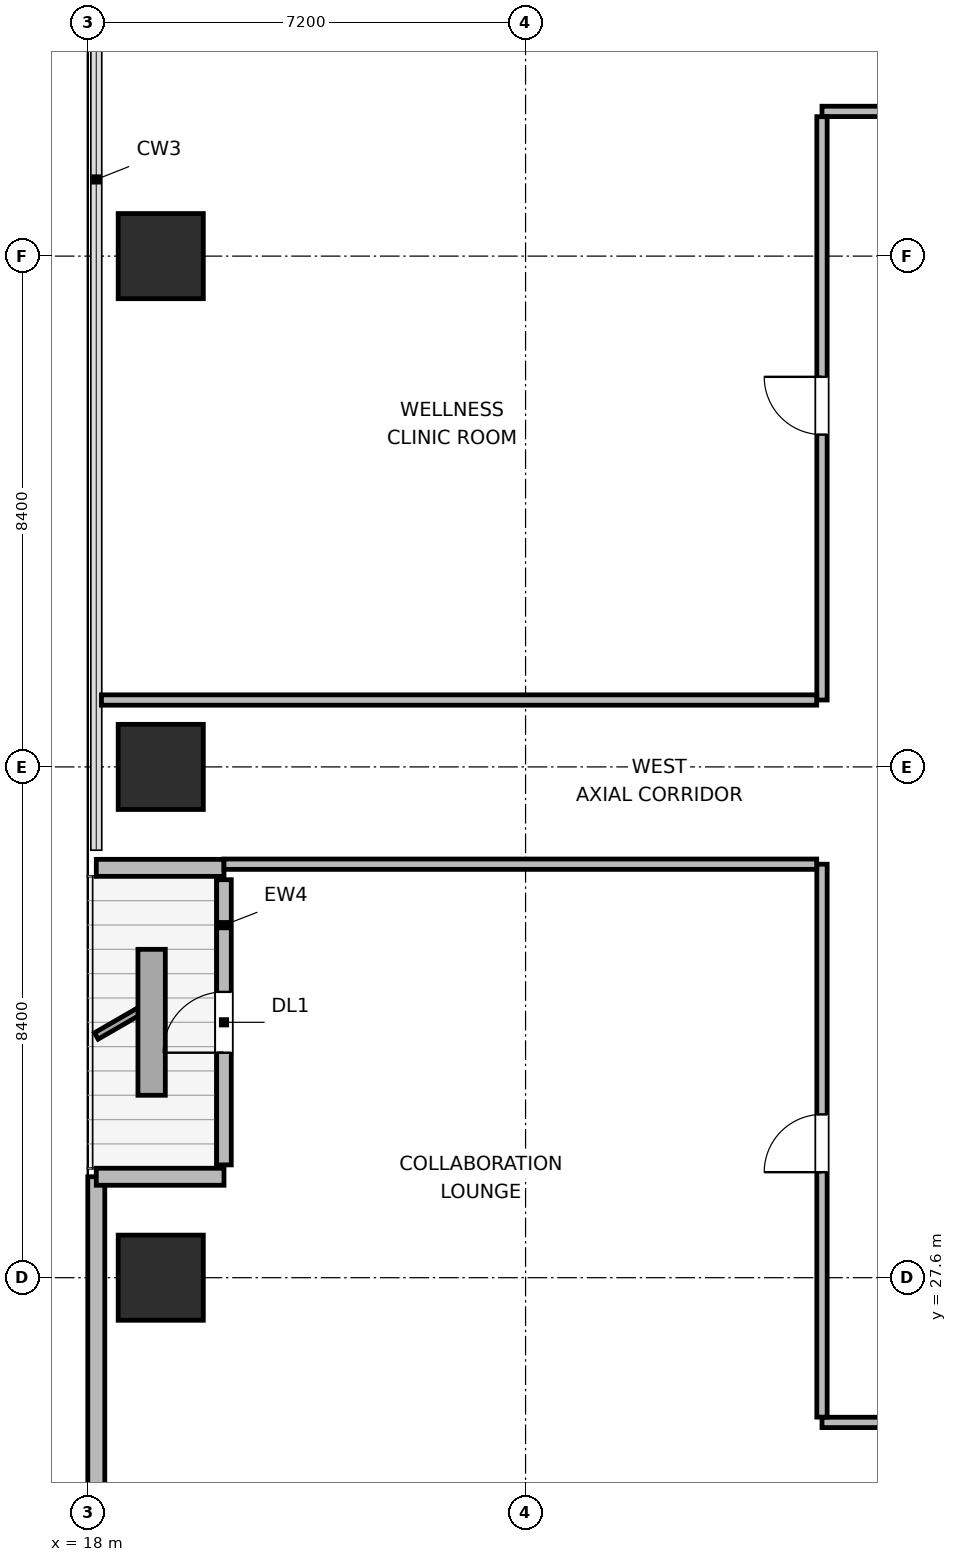
"""IFC4 building model, lengths in metres.
Left out: names, types, materials, properties, quantities, classifications, styles, units other than length and angle.
Written with IfcOpenShell. Run it as: python <this file> out.ifc"""

import sys

from ifc_helpers import new_model, si_unit, direction, frame, frame_2d, origin, origin_2d, place, context, subcontext, project, spatial, rectangle, extrude, element, fill, save


model = new_model("IFC4")
c1 = context("Model", 3, precision=1e-05, world=origin(), true_north=direction((0.0, 1.0)))
c2 = subcontext(c1, "Body", "Model", "MODEL_VIEW")
j1 = project(units=[si_unit("LENGTHUNIT", "METRE"), si_unit("PLANEANGLEUNIT", "RADIAN")], contexts=[c1])
p1 = place(None, origin())
s1 = spatial("IfcSite", under=j1, at=p1, CompositionType="ELEMENT")
p2 = place(p1, origin())
s2 = spatial("IfcBuilding", under=s1, at=p2, CompositionType="ELEMENT")
p3 = place(p2, frame((0.0, 0.0, 158.4)))
s3 = spatial("IfcBuildingStorey", under=s2, at=p3, CompositionType="ELEMENT", Elevation=158.4)
for number, where, z_axis, x_axis in (
    (1, (19.2, 27.6, 0.0), (0.0, 0.0, 1.0), (1.0, 0.0, 0.0)),
    (2, (19.2, 36.0, 0.0), (0.0, 0.0, 1.0), (1.0, 0.0, 0.0)),
    (3, (19.2, 44.4, 0.0), (0.0, 0.0, 1.0), (1.0, 0.0, 0.0)),
):
    element("IfcColumn", number, at=place(p3, frame(where, z_axis=z_axis, x_axis=x_axis)), inside=s3, PredefinedType="COLUMN", context=c2, shape_type="SweptSolid", body=[
        extrude(rectangle(XDim=1.4, YDim=1.4, at=origin_2d()), origin(), (0.0, 0.0, 1.0), 3.9),
    ])
p4 = place(p3, frame((18.14, 24.018, 0.0), z_axis=(0.0, 0.0, 1.0), x_axis=(0.0, 1.0, 0.0)))
e4 = element("IfcWall", 4, at=p4, inside=s3, PredefinedType="SOLIDWALL", context=c2, shape_type="SweptSolid", body=[
    extrude(rectangle(XDim=5.242, YDim=0.28, at=frame_2d((2.621, 0.0))), origin(), (0.0, 0.0, 1.0), 3.68),
])
p5 = place(p3, frame((18.14, 29.26, 0.0), z_axis=(0.0, 0.0, 1.0), x_axis=(1.0, 0.0, 0.0)))
e5 = element("IfcWall", 5, at=p5, inside=s3, PredefinedType="SOLIDWALL", context=c2, shape_type="SweptSolid", body=[
    extrude(rectangle(XDim=2.1, YDim=0.28, at=frame_2d((1.05, 0.0))), origin(), (0.0, 0.0, 1.0), 3.116),
])
p6 = place(p3, frame((20.24, 29.455, 0.0), z_axis=(0.0, 0.0, 1.0), x_axis=(0.0, 1.0, 0.0)))
e6 = element("IfcWall", 6, at=p6, inside=s3, PredefinedType="SOLIDWALL", context=c2, shape_type="SweptSolid", body=[
    extrude(rectangle(XDim=4.69, YDim=0.24, at=frame_2d((2.345, 0.0))), origin(), (0.0, 0.0, 1.0), 3.248),
])
p7 = place(p6, frame((1.845, 0.0, 0.0)))
e7 = element("IfcOpeningElement", 7, at=p7, cuts=e6, PredefinedType="OPENING", context=c2, shape_type="SweptSolid", body=[
    extrude(rectangle(XDim=1.0, YDim=2.02, at=frame_2d((0.5, 1.01))), frame((0.0, 0.13, 0.0), z_axis=(0.0, -1.0, 0.0), x_axis=(1.0, 0.0, 0.0)), (0.0, 0.0, 1.0), 0.26),
])
p8 = place(p3, frame((20.24, 34.34, 0.0), z_axis=(0.0, 0.0, 1.0), x_axis=(-1.0, 0.0, 0.0)))
e8 = element("IfcWall", 8, at=p8, inside=s3, PredefinedType="SOLIDWALL", context=c2, shape_type="SweptSolid", body=[
    extrude(rectangle(XDim=2.1, YDim=0.28, at=frame_2d((1.05, 0.0))), origin(), (0.0, 0.0, 1.0), 3.116),
])
p9 = place(p3, frame((30.075, 25.22, 0.0), z_axis=(0.0, 0.0, 1.0), x_axis=(1.0, 0.0, 0.0)))
e9 = element("IfcWall", 9, at=p9, inside=s3, PredefinedType="PARTITIONING", context=c2, shape_type="SweptSolid", body=[
    extrude(rectangle(XDim=33.525, YDim=0.17, at=frame_2d((16.763, 0.0))), origin(), (0.0, 0.0, 1.0), 3.68),
])
p10 = place(p9, frame((3.238, 0.0, 0.0)))
e10 = element("IfcOpeningElement", 10, at=p10, cuts=e9, PredefinedType="OPENING", context=c2, shape_type="SweptSolid", body=[
    extrude(rectangle(XDim=0.95, YDim=2.04, at=frame_2d((0.475, 1.02))), frame((0.0, 0.095, 0.0), z_axis=(0.0, -1.0, 0.0), x_axis=(1.0, 0.0, 0.0)), (0.0, 0.0, 1.0), 0.19),
])
p11 = place(p9, frame((10.065, 0.0, 0.0)))
e11 = element("IfcOpeningElement", 11, at=p11, cuts=e9, PredefinedType="OPENING", context=c2, shape_type="SweptSolid", body=[
    extrude(rectangle(XDim=0.95, YDim=2.04, at=frame_2d((0.475, 1.02))), frame((0.0, 0.095, 0.0), z_axis=(0.0, -1.0, 0.0), x_axis=(1.0, 0.0, 0.0)), (0.0, 0.0, 1.0), 0.19),
])
p12 = place(p9, frame((16.29, 0.0, 0.0)))
e12 = element("IfcOpeningElement", 12, at=p12, cuts=e9, PredefinedType="OPENING", context=c2, shape_type="SweptSolid", body=[
    extrude(rectangle(XDim=0.95, YDim=2.04, at=frame_2d((0.475, 1.02))), frame((0.0, 0.095, 0.0), z_axis=(0.0, -1.0, 0.0), x_axis=(1.0, 0.0, 0.0)), (0.0, 0.0, 1.0), 0.19),
])
p13 = place(p9, frame((22.51, 0.0, 0.0)))
e13 = element("IfcOpeningElement", 13, at=p13, cuts=e9, PredefinedType="OPENING", context=c2, shape_type="SweptSolid", body=[
    extrude(rectangle(XDim=0.95, YDim=2.04, at=frame_2d((0.475, 1.02))), frame((0.0, 0.095, 0.0), z_axis=(0.0, -1.0, 0.0), x_axis=(1.0, 0.0, 0.0)), (0.0, 0.0, 1.0), 0.19),
])
p14 = place(p9, frame((29.335, 0.0, 0.0)))
e14 = element("IfcOpeningElement", 14, at=p14, cuts=e9, PredefinedType="OPENING", context=c2, shape_type="SweptSolid", body=[
    extrude(rectangle(XDim=0.95, YDim=2.04, at=frame_2d((0.475, 1.02))), frame((0.0, 0.095, 0.0), z_axis=(0.0, -1.0, 0.0), x_axis=(1.0, 0.0, 0.0)), (0.0, 0.0, 1.0), 0.19),
])
p15 = place(p3, frame((30.075, 46.78, 0.0), z_axis=(0.0, 0.0, 1.0), x_axis=(1.0, 0.0, 0.0)))
e15 = element("IfcWall", 15, at=p15, inside=s3, PredefinedType="PARTITIONING", context=c2, shape_type="SweptSolid", body=[
    extrude(rectangle(XDim=33.525, YDim=0.17, at=frame_2d((16.763, 0.0))), origin(), (0.0, 0.0, 1.0), 3.68),
])
p16 = place(p15, frame((4.543, 0.0, 0.0)))
e16 = element("IfcOpeningElement", 16, at=p16, cuts=e15, PredefinedType="OPENING", context=c2, shape_type="SweptSolid", body=[
    extrude(rectangle(XDim=0.95, YDim=2.04, at=frame_2d((0.475, 1.02))), frame((0.0, 0.095, 0.0), z_axis=(0.0, -1.0, 0.0), x_axis=(1.0, 0.0, 0.0)), (0.0, 0.0, 1.0), 0.19),
])
p17 = place(p15, frame((11.37, 0.0, 0.0)))
e17 = element("IfcOpeningElement", 17, at=p17, cuts=e15, PredefinedType="OPENING", context=c2, shape_type="SweptSolid", body=[
    extrude(rectangle(XDim=0.95, YDim=2.04, at=frame_2d((0.475, 1.02))), frame((0.0, 0.095, 0.0), z_axis=(0.0, -1.0, 0.0), x_axis=(1.0, 0.0, 0.0)), (0.0, 0.0, 1.0), 0.19),
])
p18 = place(p15, frame((18.905, 0.0, 0.0)))
e18 = element("IfcOpeningElement", 18, at=p18, cuts=e15, PredefinedType="OPENING", context=c2, shape_type="SweptSolid", body=[
    extrude(rectangle(XDim=0.95, YDim=2.04, at=frame_2d((0.475, 1.02))), frame((0.0, 0.095, 0.0), z_axis=(0.0, -1.0, 0.0), x_axis=(1.0, 0.0, 0.0)), (0.0, 0.0, 1.0), 0.19),
])
p19 = place(p15, frame((27.74, 0.0, 0.0)))
e19 = element("IfcOpeningElement", 19, at=p19, cuts=e15, PredefinedType="OPENING", context=c2, shape_type="SweptSolid", body=[
    extrude(rectangle(XDim=0.95, YDim=2.04, at=frame_2d((0.475, 1.02))), frame((0.0, 0.095, 0.0), z_axis=(0.0, -1.0, 0.0), x_axis=(1.0, 0.0, 0.0)), (0.0, 0.0, 1.0), 0.19),
])
p20 = place(p15, frame((31.95, 0.0, 0.0)))
e20 = element("IfcOpeningElement", 20, at=p20, cuts=e15, PredefinedType="OPENING", context=c2, shape_type="SweptSolid", body=[
    extrude(rectangle(XDim=0.95, YDim=2.04, at=frame_2d((0.475, 1.02))), frame((0.0, 0.095, 0.0), z_axis=(0.0, -1.0, 0.0), x_axis=(1.0, 0.0, 0.0)), (0.0, 0.0, 1.0), 0.19),
])
p21 = place(p3, frame((30.075, 25.307, 0.0), z_axis=(0.0, 0.0, 1.0), x_axis=(0.0, 1.0, 0.0)))
e21 = element("IfcWall", 21, at=p21, inside=s3, PredefinedType="PARTITIONING", context=c2, shape_type="SweptSolid", body=[
    extrude(rectangle(XDim=9.093, YDim=0.17, at=frame_2d((4.546, 0.0))), origin(), (0.0, 0.0, 1.0), 3.68),
])
p22 = place(p21, frame((4.028, 0.0, 0.0)))
e22 = element("IfcOpeningElement", 22, at=p22, cuts=e21, PredefinedType="OPENING", context=c2, shape_type="SweptSolid", body=[
    extrude(rectangle(XDim=0.95, YDim=2.04, at=frame_2d((0.475, 1.02))), frame((0.0, 0.095, 0.0), z_axis=(0.0, -1.0, 0.0), x_axis=(1.0, 0.0, 0.0)), (0.0, 0.0, 1.0), 0.19),
])
p23 = place(p3, frame((30.075, 37.1, 0.0), z_axis=(0.0, 0.0, 1.0), x_axis=(0.0, 1.0, 0.0)))
e23 = element("IfcWall", 23, at=p23, inside=s3, PredefinedType="PARTITIONING", context=c2, shape_type="SweptSolid", body=[
    extrude(rectangle(XDim=9.593, YDim=0.17, at=frame_2d((4.796, 0.0))), origin(), (0.0, 0.0, 1.0), 3.68),
])
p24 = place(p23, frame((4.365, 0.0, 0.0)))
e24 = element("IfcOpeningElement", 24, at=p24, cuts=e23, PredefinedType="OPENING", context=c2, shape_type="SweptSolid", body=[
    extrude(rectangle(XDim=0.95, YDim=2.04, at=frame_2d((0.475, 1.02))), frame((0.0, 0.095, 0.0), z_axis=(0.0, -1.0, 0.0), x_axis=(1.0, 0.0, 0.0)), (0.0, 0.0, 1.0), 0.19),
])
p25 = place(p3, frame((20.24, 34.4, 0.0), z_axis=(0.0, 0.0, 1.0), x_axis=(1.0, 0.0, 0.0)))
e25 = element("IfcWall", 25, at=p25, inside=s3, PredefinedType="PARTITIONING", context=c2, shape_type="SweptSolid", body=[
    extrude(rectangle(XDim=9.748, YDim=0.17, at=frame_2d((4.874, 0.0))), origin(), (0.0, 0.0, 1.0), 3.68),
])
p26 = place(p3, frame((18.225, 37.1, 0.0), z_axis=(0.0, 0.0, 1.0), x_axis=(1.0, 0.0, 0.0)))
e26 = element("IfcWall", 26, at=p26, inside=s3, PredefinedType="PARTITIONING", context=c2, shape_type="SweptSolid", body=[
    extrude(rectangle(XDim=11.763, YDim=0.17, at=frame_2d((5.881, 0.0))), origin(), (0.0, 0.0, 1.0), 3.68),
])
p27 = place(p7, origin())
e27 = element("IfcDoor", 27, at=p27, inside=s3, OperationType="SINGLE_SWING_LEFT", PredefinedType="DOOR", context=c2, shape_type="SweptSolid", body=[
    extrude(rectangle(XDim=1.0, YDim=2.02, at=frame_2d((0.5, 1.01))), frame((0.0, 0.025, 0.0), z_axis=(0.0, -1.0, 0.0), x_axis=(1.0, 0.0, 0.0)), (0.0, 0.0, 1.0), 0.05),
])
fill(e7, e27)
p28 = place(p22, origin())
e28 = element("IfcDoor", 28, at=p28, inside=s3, OperationType="SINGLE_SWING_LEFT", PredefinedType="DOOR", context=c2, shape_type="SweptSolid", body=[
    extrude(rectangle(XDim=0.95, YDim=2.04, at=frame_2d((0.475, 1.02))), frame((0.0, 0.025, 0.0), z_axis=(0.0, -1.0, 0.0), x_axis=(1.0, 0.0, 0.0)), (0.0, 0.0, 1.0), 0.05),
])
fill(e22, e28)
p29 = place(p24, origin())
e29 = element("IfcDoor", 29, at=p29, inside=s3, OperationType="SINGLE_SWING_RIGHT", PredefinedType="DOOR", context=c2, shape_type="SweptSolid", body=[
    extrude(rectangle(XDim=0.95, YDim=2.04, at=frame_2d((0.475, 1.02))), frame((0.0, 0.025, 0.0), z_axis=(0.0, -1.0, 0.0), x_axis=(1.0, 0.0, 0.0)), (0.0, 0.0, 1.0), 0.05),
])
fill(e24, e29)
save(model, sys.argv[1])
